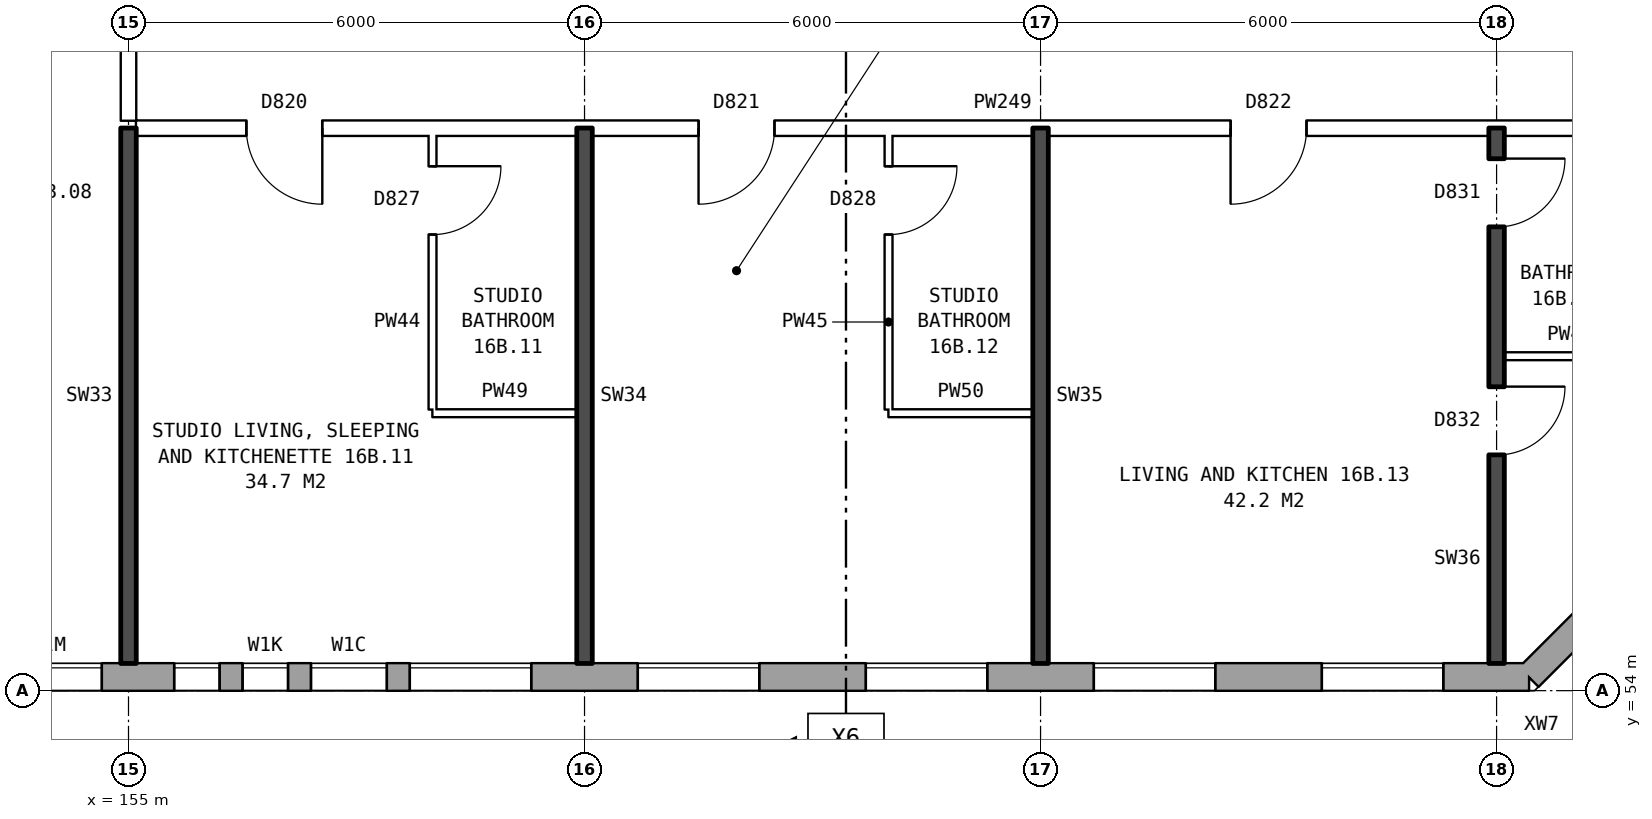
"""IFC4 building model, lengths in metres.
Left out: names, types, materials, properties, quantities, classifications, styles, units other than length and angle.
Written with IfcOpenShell. Run it as: python <this file> out.ifc"""

import sys

from ifc_helpers import new_model, si_unit, direction, frame, frame_2d, origin, place, context, subcontext, project, spatial, rectangle, extrude, element, fill, save


model = new_model("IFC4")
c1 = context("Model", 3, precision=1e-05, world=origin(), true_north=direction((0.0, 1.0)))
c2 = subcontext(c1, "Body", "Model", "MODEL_VIEW")
j1 = project(units=[si_unit("LENGTHUNIT", "METRE"), si_unit("PLANEANGLEUNIT", "RADIAN")], contexts=[c1])
p1 = place(None, origin())
s1 = spatial("IfcSite", under=j1, at=p1, CompositionType="ELEMENT")
p2 = place(p1, origin())
s2 = spatial("IfcBuilding", under=s1, at=p2, CompositionType="ELEMENT")
p3 = place(p2, frame((0.0, 0.0, 59.8)))
s3 = spatial("IfcBuildingStorey", under=s2, at=p3, CompositionType="ELEMENT", Elevation=59.8)
p4 = place(p3, frame((134.075, 54.18, 0.0), z_axis=(0.0, 0.0, 1.0), x_axis=(1.0, 0.0, 0.0)))
e1 = element("IfcWall", 1, at=p4, inside=s3, PredefinedType="STANDARD", context=c2, shape_type="SweptSolid", body=[
    extrude(rectangle(XDim=39.351, YDim=0.36, at=frame_2d((19.675, 0.0))), origin(), (0.0, 0.0, 1.0), 2.85),
])
p5 = place(p4, frame((0.625, 0.0, 0.8)))
e2 = element("IfcOpeningElement", 2, at=p5, cuts=e1, PredefinedType="OPENING", context=c2, shape_type="SweptSolid", body=[
    extrude(rectangle(XDim=1.6, YDim=1.8, at=frame_2d((0.8, 0.9))), frame((0.0, 0.19, 0.0), z_axis=(0.0, -1.0, 0.0), x_axis=(1.0, 0.0, 0.0)), (0.0, 0.0, 1.0), 0.38),
])
p6 = place(p4, frame((3.625, 0.0, 0.8)))
e3 = element("IfcOpeningElement", 3, at=p6, cuts=e1, PredefinedType="OPENING", context=c2, shape_type="SweptSolid", body=[
    extrude(rectangle(XDim=1.6, YDim=1.8, at=frame_2d((0.8, 0.9))), frame((0.0, 0.19, 0.0), z_axis=(0.0, -1.0, 0.0), x_axis=(1.0, 0.0, 0.0)), (0.0, 0.0, 1.0), 0.38),
])
p7 = place(p4, frame((6.625, 0.0, 0.8)))
e4 = element("IfcOpeningElement", 4, at=p7, cuts=e1, PredefinedType="OPENING", context=c2, shape_type="SweptSolid", body=[
    extrude(rectangle(XDim=1.6, YDim=1.8, at=frame_2d((0.8, 0.9))), frame((0.0, 0.19, 0.0), z_axis=(0.0, -1.0, 0.0), x_axis=(1.0, 0.0, 0.0)), (0.0, 0.0, 1.0), 0.38),
])
p8 = place(p4, frame((9.625, 0.0, 0.8)))
e5 = element("IfcOpeningElement", 5, at=p8, cuts=e1, PredefinedType="OPENING", context=c2, shape_type="SweptSolid", body=[
    extrude(rectangle(XDim=1.6, YDim=1.8, at=frame_2d((0.8, 0.9))), frame((0.0, 0.19, 0.0), z_axis=(0.0, -1.0, 0.0), x_axis=(1.0, 0.0, 0.0)), (0.0, 0.0, 1.0), 0.38),
])
p9 = place(p4, frame((12.625, 0.0, 0.8)))
e6 = element("IfcOpeningElement", 6, at=p9, cuts=e1, PredefinedType="OPENING", context=c2, shape_type="SweptSolid", body=[
    extrude(rectangle(XDim=1.6, YDim=1.8, at=frame_2d((0.8, 0.9))), frame((0.0, 0.19, 0.0), z_axis=(0.0, -1.0, 0.0), x_axis=(1.0, 0.0, 0.0)), (0.0, 0.0, 1.0), 0.38),
])
p10 = place(p4, frame((15.125, 0.0, 0.8)))
e7 = element("IfcOpeningElement", 7, at=p10, cuts=e1, PredefinedType="OPENING", context=c2, shape_type="SweptSolid", body=[
    extrude(rectangle(XDim=1.6, YDim=1.8, at=frame_2d((0.8, 0.9))), frame((0.0, 0.19, 0.0), z_axis=(0.0, -1.0, 0.0), x_axis=(1.0, 0.0, 0.0)), (0.0, 0.0, 1.0), 0.38),
])
p11 = place(p4, frame((18.275, 0.0, 0.15)))
e8 = element("IfcOpeningElement", 8, at=p11, cuts=e1, PredefinedType="OPENING", context=c2, shape_type="SweptSolid", body=[
    extrude(rectangle(XDim=0.6, YDim=0.9, at=frame_2d((0.3, 0.45))), frame((0.0, 0.19, 0.0), z_axis=(0.0, -1.0, 0.0), x_axis=(1.0, 0.0, 0.0)), (0.0, 0.0, 1.0), 0.38),
])
p12 = place(p4, frame((21.525, 0.0, 1.7)))
e9 = element("IfcOpeningElement", 9, at=p12, cuts=e1, PredefinedType="OPENING", context=c2, shape_type="SweptSolid", body=[
    extrude(rectangle(XDim=0.6, YDim=0.9, at=frame_2d((0.3, 0.45))), frame((0.0, 0.19, 0.0), z_axis=(0.0, -1.0, 0.0), x_axis=(1.0, 0.0, 0.0)), (0.0, 0.0, 1.0), 0.38),
])
p13 = place(p4, frame((24.625, 0.0, 0.8)))
e10 = element("IfcOpeningElement", 10, at=p13, cuts=e1, PredefinedType="OPENING", context=c2, shape_type="SweptSolid", body=[
    extrude(rectangle(XDim=1.6, YDim=1.8, at=frame_2d((0.8, 0.9))), frame((0.0, 0.19, 0.0), z_axis=(0.0, -1.0, 0.0), x_axis=(1.0, 0.0, 0.0)), (0.0, 0.0, 1.0), 0.38),
])
p14 = place(p4, frame((27.625, 0.0, 0.8)))
e11 = element("IfcOpeningElement", 11, at=p14, cuts=e1, PredefinedType="OPENING", context=c2, shape_type="SweptSolid", body=[
    extrude(rectangle(XDim=1.6, YDim=1.8, at=frame_2d((0.8, 0.9))), frame((0.0, 0.19, 0.0), z_axis=(0.0, -1.0, 0.0), x_axis=(1.0, 0.0, 0.0)), (0.0, 0.0, 1.0), 0.38),
])
p15 = place(p4, frame((30.625, 0.0, 0.8)))
e12 = element("IfcOpeningElement", 12, at=p15, cuts=e1, PredefinedType="OPENING", context=c2, shape_type="SweptSolid", body=[
    extrude(rectangle(XDim=1.6, YDim=1.8, at=frame_2d((0.8, 0.9))), frame((0.0, 0.19, 0.0), z_axis=(0.0, -1.0, 0.0), x_axis=(1.0, 0.0, 0.0)), (0.0, 0.0, 1.0), 0.38),
])
p16 = place(p4, frame((33.625, 0.0, 0.8)))
e13 = element("IfcOpeningElement", 13, at=p16, cuts=e1, PredefinedType="OPENING", context=c2, shape_type="SweptSolid", body=[
    extrude(rectangle(XDim=1.6, YDim=1.8, at=frame_2d((0.8, 0.9))), frame((0.0, 0.19, 0.0), z_axis=(0.0, -1.0, 0.0), x_axis=(1.0, 0.0, 0.0)), (0.0, 0.0, 1.0), 0.38),
])
p17 = place(p4, frame((36.625, 0.0, 0.8)))
e14 = element("IfcOpeningElement", 14, at=p17, cuts=e1, PredefinedType="OPENING", context=c2, shape_type="SweptSolid", body=[
    extrude(rectangle(XDim=1.6, YDim=1.8, at=frame_2d((0.8, 0.9))), frame((0.0, 0.19, 0.0), z_axis=(0.0, -1.0, 0.0), x_axis=(1.0, 0.0, 0.0)), (0.0, 0.0, 1.0), 0.38),
])
p18 = place(p4, frame((17.025, 0.0, 1.6)))
e15 = element("IfcOpeningElement", 15, at=p18, cuts=e1, PredefinedType="OPENING", context=c2, shape_type="SweptSolid", body=[
    extrude(rectangle(XDim=0.6, YDim=0.9, at=frame_2d((0.3, 0.45))), frame((0.0, 0.19, 0.0), z_axis=(0.0, -1.0, 0.0), x_axis=(1.0, 0.0, 0.0)), (0.0, 0.0, 1.0), 0.38),
])
p19 = place(p4, frame((19.175, 0.0, 0.25)))
e16 = element("IfcOpeningElement", 16, at=p19, cuts=e1, PredefinedType="OPENING", context=c2, shape_type="SweptSolid", body=[
    extrude(rectangle(XDim=1.4, YDim=1.2, at=frame_2d((0.7, 0.6))), frame((0.0, 0.19, 0.0), z_axis=(0.0, -1.0, 0.0), x_axis=(1.0, 0.0, 0.0)), (0.0, 0.0, 1.0), 0.38),
])
p20 = place(p4, frame((22.425, 0.0, 1.0)))
e17 = element("IfcOpeningElement", 17, at=p20, cuts=e1, PredefinedType="OPENING", context=c2, shape_type="SweptSolid", body=[
    extrude(rectangle(XDim=0.6, YDim=1.5, at=frame_2d((0.3, 0.75))), frame((0.0, 0.19, 0.0), z_axis=(0.0, -1.0, 0.0), x_axis=(1.0, 0.0, 0.0)), (0.0, 0.0, 1.0), 0.38),
])
p21 = place(p4, frame((23.325, 0.0, 0.8)))
e18 = element("IfcOpeningElement", 18, at=p21, cuts=e1, PredefinedType="OPENING", context=c2, shape_type="SweptSolid", body=[
    extrude(rectangle(XDim=1.0, YDim=1.8, at=frame_2d((0.5, 0.9))), frame((0.0, 0.19, 0.0), z_axis=(0.0, -1.0, 0.0), x_axis=(1.0, 0.0, 0.0)), (0.0, 0.0, 1.0), 0.38),
])
p22 = place(p3, frame((173.425, 54.18, 0.0), z_axis=(0.0, 0.0, 1.0), x_axis=(0.707106781187, 0.707106781187, 0.0)))
e19 = element("IfcWall", 19, at=p22, inside=s3, PredefinedType="STANDARD", context=c2, shape_type="SweptSolid", body=[
    extrude(rectangle(XDim=4.094, YDim=0.36, at=frame_2d((2.047, 0.0))), origin(), (0.0, 0.0, 1.0), 2.85),
])
p23 = place(p22, frame((1.247, 0.0, 0.8)))
e20 = element("IfcOpeningElement", 20, at=p23, cuts=e19, PredefinedType="OPENING", context=c2, shape_type="SweptSolid", body=[
    extrude(rectangle(XDim=1.6, YDim=1.8, at=frame_2d((0.8, 0.9))), frame((0.0, 0.19, 0.0), z_axis=(0.0, -1.0, 0.0), x_axis=(1.0, 0.0, 0.0)), (0.0, 0.0, 1.0), 0.38),
])
for number, where, z_axis, x_axis in (
    (21, (159.0, 57.65, 0.0), (0.0, 0.0, 1.0), (1.0, 0.0, 0.0)),
    (22, (165.0, 57.65, 0.0), (0.0, 0.0, 1.0), (1.0, 0.0, 0.0)),
):
    element("IfcWall", number, at=place(p3, frame(where, z_axis=z_axis, x_axis=x_axis)), inside=s3, PredefinedType="PARTITIONING", context=c2, shape_type="SweptSolid", body=[
        extrude(rectangle(XDim=1.9, YDim=0.1, at=frame_2d((0.95, 0.0))), origin(), (0.0, 0.0, 1.0), 2.85),
    ])
p24 = place(p3, frame((173.1, 58.4, 0.0), z_axis=(0.0, 0.0, 1.0), x_axis=(1.0, 0.0, 0.0)))
e23 = element("IfcWall", 23, at=p24, inside=s3, PredefinedType="PARTITIONING", context=c2, shape_type="SweptSolid", body=[
    extrude(rectangle(XDim=1.74, YDim=0.1, at=frame_2d((0.87, 0.0))), origin(), (0.0, 0.0, 1.0), 2.85),
])
p25 = place(p3, frame((155.1, 61.4, 0.0), z_axis=(0.0, 0.0, 1.0), x_axis=(1.0, 0.0, 0.0)))
e24 = element("IfcWall", 24, at=p25, inside=s3, PredefinedType="PARTITIONING", context=c2, shape_type="SweptSolid", body=[
    extrude(rectangle(XDim=21.04, YDim=0.2, at=frame_2d((10.52, 0.0))), origin(), (0.0, 0.0, 1.0), 2.85),
])
p26 = place(p25, frame((1.45, 0.0, 0.0)))
e25 = element("IfcOpeningElement", 25, at=p26, cuts=e24, PredefinedType="OPENING", context=c2, shape_type="SweptSolid", body=[
    extrude(rectangle(XDim=1.0, YDim=2.1, at=frame_2d((0.5, 1.05))), frame((0.0, 0.11, 0.0), z_axis=(0.0, -1.0, 0.0), x_axis=(1.0, 0.0, 0.0)), (0.0, 0.0, 1.0), 0.22),
])
p27 = place(p25, frame((7.4, 0.0, 0.0)))
e26 = element("IfcOpeningElement", 26, at=p27, cuts=e24, PredefinedType="OPENING", context=c2, shape_type="SweptSolid", body=[
    extrude(rectangle(XDim=1.0, YDim=2.1, at=frame_2d((0.5, 1.05))), frame((0.0, 0.11, 0.0), z_axis=(0.0, -1.0, 0.0), x_axis=(1.0, 0.0, 0.0)), (0.0, 0.0, 1.0), 0.22),
])
p28 = place(p25, frame((14.4, 0.0, 0.0)))
e27 = element("IfcOpeningElement", 27, at=p28, cuts=e24, PredefinedType="OPENING", context=c2, shape_type="SweptSolid", body=[
    extrude(rectangle(XDim=1.0, YDim=2.1, at=frame_2d((0.5, 1.05))), frame((0.0, 0.11, 0.0), z_axis=(0.0, -1.0, 0.0), x_axis=(1.0, 0.0, 0.0)), (0.0, 0.0, 1.0), 0.22),
])
p29 = place(p3, frame((155.0, 54.36, 0.0), z_axis=(0.0, 0.0, 1.0), x_axis=(0.0, 1.0, 0.0)))
e28 = element("IfcWall", 28, at=p29, inside=s3, PredefinedType="SOLIDWALL", context=c2, shape_type="SweptSolid", body=[
    extrude(rectangle(XDim=7.04, YDim=0.2, at=frame_2d((3.52, 0.0))), origin(), (0.0, 0.0, 1.0), 2.85),
])
p30 = place(p3, frame((155.0, 61.5, 0.0), z_axis=(0.0, 0.0, 1.0), x_axis=(0.0, 1.0, 0.0)))
e29 = element("IfcWall", 29, at=p30, inside=s3, PredefinedType="PARTITIONING", context=c2, shape_type="SweptSolid", body=[
    extrude(rectangle(XDim=2.2, YDim=0.2, at=frame_2d((1.1, 0.0))), origin(), (0.0, 0.0, 1.0), 2.85),
])
p31 = place(p3, frame((159.0, 57.7, 0.0), z_axis=(0.0, 0.0, 1.0), x_axis=(0.0, 1.0, 0.0)))
e30 = element("IfcWall", 30, at=p31, inside=s3, PredefinedType="PARTITIONING", context=c2, shape_type="SweptSolid", body=[
    extrude(rectangle(XDim=3.6, YDim=0.1, at=frame_2d((1.8, 0.0))), origin(), (0.0, 0.0, 1.0), 2.85),
])
p32 = place(p31, frame((2.3, 0.0, 0.0)))
e31 = element("IfcOpeningElement", 31, at=p32, cuts=e30, PredefinedType="OPENING", context=c2, shape_type="SweptSolid", body=[
    extrude(rectangle(XDim=0.9, YDim=2.1, at=frame_2d((0.45, 1.05))), frame((0.0, 0.06, 0.0), z_axis=(0.0, -1.0, 0.0), x_axis=(1.0, 0.0, 0.0)), (0.0, 0.0, 1.0), 0.12),
])
p33 = place(p3, frame((161.0, 54.36, 0.0), z_axis=(0.0, 0.0, 1.0), x_axis=(0.0, 1.0, 0.0)))
e32 = element("IfcWall", 32, at=p33, inside=s3, PredefinedType="SOLIDWALL", context=c2, shape_type="SweptSolid", body=[
    extrude(rectangle(XDim=7.04, YDim=0.2, at=frame_2d((3.52, 0.0))), origin(), (0.0, 0.0, 1.0), 2.85),
])
p34 = place(p3, frame((165.0, 57.7, 0.0), z_axis=(0.0, 0.0, 1.0), x_axis=(0.0, 1.0, 0.0)))
e33 = element("IfcWall", 33, at=p34, inside=s3, PredefinedType="PARTITIONING", context=c2, shape_type="SweptSolid", body=[
    extrude(rectangle(XDim=3.6, YDim=0.1, at=frame_2d((1.8, 0.0))), origin(), (0.0, 0.0, 1.0), 2.85),
])
p35 = place(p34, frame((2.3, 0.0, 0.0)))
e34 = element("IfcOpeningElement", 34, at=p35, cuts=e33, PredefinedType="OPENING", context=c2, shape_type="SweptSolid", body=[
    extrude(rectangle(XDim=0.9, YDim=2.1, at=frame_2d((0.45, 1.05))), frame((0.0, 0.06, 0.0), z_axis=(0.0, -1.0, 0.0), x_axis=(1.0, 0.0, 0.0)), (0.0, 0.0, 1.0), 0.12),
])
p36 = place(p3, frame((167.0, 54.36, 0.0), z_axis=(0.0, 0.0, 1.0), x_axis=(0.0, 1.0, 0.0)))
e35 = element("IfcWall", 35, at=p36, inside=s3, PredefinedType="SOLIDWALL", context=c2, shape_type="SweptSolid", body=[
    extrude(rectangle(XDim=7.04, YDim=0.2, at=frame_2d((3.52, 0.0))), origin(), (0.0, 0.0, 1.0), 2.85),
])
p37 = place(p3, frame((173.0, 54.36, 0.0), z_axis=(0.0, 0.0, 1.0), x_axis=(0.0, 1.0, 0.0)))
e36 = element("IfcWall", 36, at=p37, inside=s3, PredefinedType="SOLIDWALL", context=c2, shape_type="SweptSolid", body=[
    extrude(rectangle(XDim=7.04, YDim=0.2, at=frame_2d((3.52, 0.0))), origin(), (0.0, 0.0, 1.0), 2.85),
])
p38 = place(p37, frame((2.74, 0.0, 0.0)))
e37 = element("IfcOpeningElement", 37, at=p38, cuts=e36, PredefinedType="OPENING", context=c2, shape_type="SweptSolid", body=[
    extrude(rectangle(XDim=0.9, YDim=2.1, at=frame_2d((0.45, 1.05))), frame((0.0, 0.11, 0.0), z_axis=(0.0, -1.0, 0.0), x_axis=(1.0, 0.0, 0.0)), (0.0, 0.0, 1.0), 0.22),
])
p39 = place(p37, frame((5.74, 0.0, 0.0)))
e38 = element("IfcOpeningElement", 38, at=p39, cuts=e36, PredefinedType="OPENING", context=c2, shape_type="SweptSolid", body=[
    extrude(rectangle(XDim=0.9, YDim=2.1, at=frame_2d((0.45, 1.05))), frame((0.0, 0.11, 0.0), z_axis=(0.0, -1.0, 0.0), x_axis=(1.0, 0.0, 0.0)), (0.0, 0.0, 1.0), 0.22),
])
p40 = place(p12, origin())
e39 = element("IfcWindow", 39, at=p40, inside=s3, PartitioningType="SINGLE_PANEL", PredefinedType="WINDOW", context=c2, shape_type="SweptSolid", body=[
    extrude(rectangle(XDim=0.6, YDim=0.9, at=frame_2d((0.3, 0.45))), frame((0.0, 0.15, 0.0), z_axis=(0.0, -1.0, 0.0), x_axis=(1.0, 0.0, 0.0)), (0.0, 0.0, 1.0), 0.06),
])
fill(e9, e39)
p41 = place(p13, origin())
e40 = element("IfcWindow", 40, at=p41, inside=s3, PartitioningType="SINGLE_PANEL", PredefinedType="WINDOW", context=c2, shape_type="SweptSolid", body=[
    extrude(rectangle(XDim=1.6, YDim=1.8, at=frame_2d((0.8, 0.9))), frame((0.0, 0.15, 0.0), z_axis=(0.0, -1.0, 0.0), x_axis=(1.0, 0.0, 0.0)), (0.0, 0.0, 1.0), 0.06),
])
fill(e10, e40)
p42 = place(p14, origin())
e41 = element("IfcWindow", 41, at=p42, inside=s3, PartitioningType="SINGLE_PANEL", PredefinedType="WINDOW", context=c2, shape_type="SweptSolid", body=[
    extrude(rectangle(XDim=1.6, YDim=1.8, at=frame_2d((0.8, 0.9))), frame((0.0, 0.15, 0.0), z_axis=(0.0, -1.0, 0.0), x_axis=(1.0, 0.0, 0.0)), (0.0, 0.0, 1.0), 0.06),
])
fill(e11, e41)
p43 = place(p15, origin())
e42 = element("IfcWindow", 42, at=p43, inside=s3, PartitioningType="SINGLE_PANEL", PredefinedType="WINDOW", context=c2, shape_type="SweptSolid", body=[
    extrude(rectangle(XDim=1.6, YDim=1.8, at=frame_2d((0.8, 0.9))), frame((0.0, 0.15, 0.0), z_axis=(0.0, -1.0, 0.0), x_axis=(1.0, 0.0, 0.0)), (0.0, 0.0, 1.0), 0.06),
])
fill(e12, e42)
p44 = place(p16, origin())
e43 = element("IfcWindow", 43, at=p44, inside=s3, PartitioningType="SINGLE_PANEL", PredefinedType="WINDOW", context=c2, shape_type="SweptSolid", body=[
    extrude(rectangle(XDim=1.6, YDim=1.8, at=frame_2d((0.8, 0.9))), frame((0.0, 0.15, 0.0), z_axis=(0.0, -1.0, 0.0), x_axis=(1.0, 0.0, 0.0)), (0.0, 0.0, 1.0), 0.06),
])
fill(e13, e43)
p45 = place(p17, origin())
e44 = element("IfcWindow", 44, at=p45, inside=s3, PartitioningType="SINGLE_PANEL", PredefinedType="WINDOW", context=c2, shape_type="SweptSolid", body=[
    extrude(rectangle(XDim=1.6, YDim=1.8, at=frame_2d((0.8, 0.9))), frame((0.0, 0.15, 0.0), z_axis=(0.0, -1.0, 0.0), x_axis=(1.0, 0.0, 0.0)), (0.0, 0.0, 1.0), 0.06),
])
fill(e14, e44)
p46 = place(p26, frame((1.0, 0.0, 0.0), z_axis=(0.0, 0.0, 1.0), x_axis=(-1.0, 0.0, 0.0)))
e45 = element("IfcDoor", 45, at=p46, inside=s3, OperationType="SINGLE_SWING_LEFT", PredefinedType="DOOR", context=c2, shape_type="SweptSolid", body=[
    extrude(rectangle(XDim=1.0, YDim=2.1, at=frame_2d((0.5, 1.05))), frame((0.0, 0.025, 0.0), z_axis=(0.0, -1.0, 0.0), x_axis=(1.0, 0.0, 0.0)), (0.0, 0.0, 1.0), 0.05),
])
fill(e25, e45)
p47 = place(p32, frame((0.9, 0.0, 0.0), z_axis=(0.0, 0.0, 1.0), x_axis=(-1.0, 0.0, 0.0)))
e46 = element("IfcDoor", 46, at=p47, inside=s3, OperationType="SINGLE_SWING_LEFT", PredefinedType="DOOR", context=c2, shape_type="SweptSolid", body=[
    extrude(rectangle(XDim=0.9, YDim=2.1, at=frame_2d((0.45, 1.05))), frame((0.0, 0.025, 0.0), z_axis=(0.0, -1.0, 0.0), x_axis=(1.0, 0.0, 0.0)), (0.0, 0.0, 1.0), 0.05),
])
fill(e31, e46)
p48 = place(p27, frame((1.0, 0.0, 0.0), z_axis=(0.0, 0.0, 1.0), x_axis=(-1.0, 0.0, 0.0)))
e47 = element("IfcDoor", 47, at=p48, inside=s3, OperationType="SINGLE_SWING_RIGHT", PredefinedType="DOOR", context=c2, shape_type="SweptSolid", body=[
    extrude(rectangle(XDim=1.0, YDim=2.1, at=frame_2d((0.5, 1.05))), frame((0.0, 0.025, 0.0), z_axis=(0.0, -1.0, 0.0), x_axis=(1.0, 0.0, 0.0)), (0.0, 0.0, 1.0), 0.05),
])
fill(e26, e47)
p49 = place(p35, frame((0.9, 0.0, 0.0), z_axis=(0.0, 0.0, 1.0), x_axis=(-1.0, 0.0, 0.0)))
e48 = element("IfcDoor", 48, at=p49, inside=s3, OperationType="SINGLE_SWING_LEFT", PredefinedType="DOOR", context=c2, shape_type="SweptSolid", body=[
    extrude(rectangle(XDim=0.9, YDim=2.1, at=frame_2d((0.45, 1.05))), frame((0.0, 0.025, 0.0), z_axis=(0.0, -1.0, 0.0), x_axis=(1.0, 0.0, 0.0)), (0.0, 0.0, 1.0), 0.05),
])
fill(e34, e48)
p50 = place(p38, frame((0.9, 0.0, 0.0), z_axis=(0.0, 0.0, 1.0), x_axis=(-1.0, 0.0, 0.0)))
e49 = element("IfcDoor", 49, at=p50, inside=s3, OperationType="SINGLE_SWING_LEFT", PredefinedType="DOOR", context=c2, shape_type="SweptSolid", body=[
    extrude(rectangle(XDim=0.9, YDim=2.1, at=frame_2d((0.45, 1.05))), frame((0.0, 0.025, 0.0), z_axis=(0.0, -1.0, 0.0), x_axis=(1.0, 0.0, 0.0)), (0.0, 0.0, 1.0), 0.05),
])
fill(e37, e49)
p51 = place(p28, frame((1.0, 0.0, 0.0), z_axis=(0.0, 0.0, 1.0), x_axis=(-1.0, 0.0, 0.0)))
e50 = element("IfcDoor", 50, at=p51, inside=s3, OperationType="SINGLE_SWING_RIGHT", PredefinedType="DOOR", context=c2, shape_type="SweptSolid", body=[
    extrude(rectangle(XDim=1.0, YDim=2.1, at=frame_2d((0.5, 1.05))), frame((0.0, 0.025, 0.0), z_axis=(0.0, -1.0, 0.0), x_axis=(1.0, 0.0, 0.0)), (0.0, 0.0, 1.0), 0.05),
])
fill(e27, e50)
p52 = place(p39, frame((0.9, 0.0, 0.0), z_axis=(0.0, 0.0, 1.0), x_axis=(-1.0, 0.0, 0.0)))
e51 = element("IfcDoor", 51, at=p52, inside=s3, OperationType="SINGLE_SWING_LEFT", PredefinedType="DOOR", context=c2, shape_type="SweptSolid", body=[
    extrude(rectangle(XDim=0.9, YDim=2.1, at=frame_2d((0.45, 1.05))), frame((0.0, 0.025, 0.0), z_axis=(0.0, -1.0, 0.0), x_axis=(1.0, 0.0, 0.0)), (0.0, 0.0, 1.0), 0.05),
])
fill(e38, e51)
p53 = place(p19, origin())
e52 = element("IfcWindow", 52, at=p53, inside=s3, PartitioningType="SINGLE_PANEL", PredefinedType="WINDOW", context=c2, shape_type="SweptSolid", body=[
    extrude(rectangle(XDim=1.4, YDim=1.2, at=frame_2d((0.7, 0.6))), frame((0.0, 0.15, 0.0), z_axis=(0.0, -1.0, 0.0), x_axis=(1.0, 0.0, 0.0)), (0.0, 0.0, 1.0), 0.06),
])
fill(e16, e52)
p54 = place(p20, origin())
e53 = element("IfcWindow", 53, at=p54, inside=s3, PartitioningType="SINGLE_PANEL", PredefinedType="WINDOW", context=c2, shape_type="SweptSolid", body=[
    extrude(rectangle(XDim=0.6, YDim=1.5, at=frame_2d((0.3, 0.75))), frame((0.0, 0.15, 0.0), z_axis=(0.0, -1.0, 0.0), x_axis=(1.0, 0.0, 0.0)), (0.0, 0.0, 1.0), 0.06),
])
fill(e17, e53)
p55 = place(p21, origin())
e54 = element("IfcWindow", 54, at=p55, inside=s3, PartitioningType="SINGLE_PANEL", PredefinedType="WINDOW", context=c2, shape_type="SweptSolid", body=[
    extrude(rectangle(XDim=1.0, YDim=1.8, at=frame_2d((0.5, 0.9))), frame((0.0, 0.15, 0.0), z_axis=(0.0, -1.0, 0.0), x_axis=(1.0, 0.0, 0.0)), (0.0, 0.0, 1.0), 0.06),
])
fill(e18, e54)
save(model, sys.argv[1])
